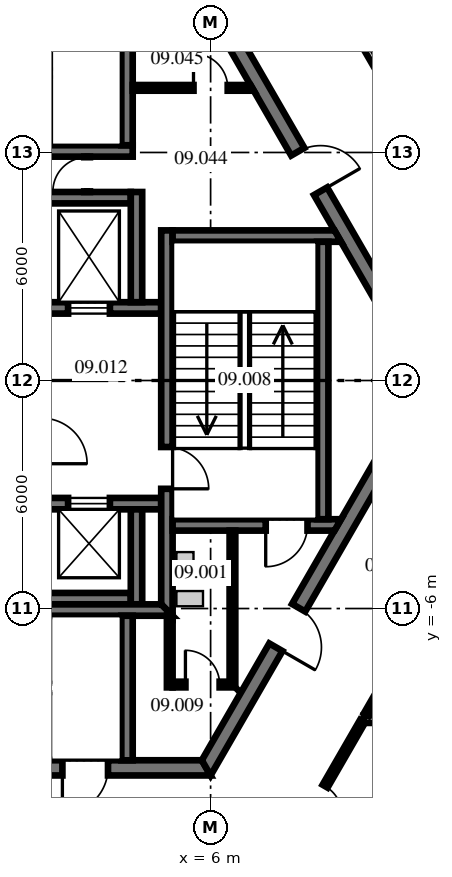
"""IFC4 building model, lengths in metres.
Left out: names, types, materials, properties, quantities, classifications, styles, units other than length and angle.
Written with IfcOpenShell. Run it as: python <this file> out.ifc"""

import sys

from ifc_helpers import new_model, si_unit, direction, frame, frame_2d, origin, place, context, subcontext, project, spatial, polyline, rectangle, outline, extrude, source, transform, mapped, element, fill, save


model = new_model("IFC4")
c1 = context("Model", 3, precision=1e-05, world=origin(), true_north=direction((0.0, 1.0)))
c2 = subcontext(c1, "Body", "Model", "MODEL_VIEW")
j1 = project(units=[si_unit("LENGTHUNIT", "METRE"), si_unit("PLANEANGLEUNIT", "RADIAN")], contexts=[c1])
p1 = place(None, origin())
s1 = spatial("IfcSite", under=j1, at=p1, CompositionType="ELEMENT")
p2 = place(p1, origin())
s2 = spatial("IfcBuilding", under=s1, at=p2, CompositionType="ELEMENT")
p3 = place(p2, frame((0.0, 0.0, 41.8)))
s3 = spatial("IfcBuildingStorey", under=s2, at=p3, CompositionType="ELEMENT", Elevation=41.8)
m1 = source(origin(), c2, "Body", "SweptSolid", [
    extrude(outline(polyline([(-0.115, -0.2), (11.885, -0.2), (11.654, 0.2), (0.115, 0.2), (-0.115, -0.2)])), origin(), (0.0, 0.0, 1.0), 4.1),
])
p4 = place(p3, frame((11.769, 0.0, 0.0), z_axis=(0.0, 0.0, 1.0), x_axis=(-0.499996592174, 0.866027371285, 0.0)))
e1 = element("IfcWall", 1, at=p4, inside=s3, PredefinedType="SHEAR", context=c2, shape_type="MappedRepresentation", body=[
    mapped(m1, transform((0.0, 0.0, 0.0), scale=1.0)),
])
p5 = place(p4, frame((5.75, 0.0, 0.0)))
e2 = element("IfcOpeningElement", 2, at=p5, cuts=e1, PredefinedType="OPENING", context=c2, shape_type="SweptSolid", body=[
    extrude(rectangle(XDim=1.2, YDim=2.1, at=frame_2d((0.6, 1.05))), frame((0.0, 0.21, 0.0), z_axis=(0.0, -1.0, 0.0), x_axis=(1.0, 0.0, 0.0)), (0.0, 0.0, 1.0), 0.42),
])
p6 = place(p3, frame((-5.885, -10.192, 0.0), z_axis=(0.0, 0.0, 1.0), x_axis=(1.0, 0.0, 0.0)))
e3 = element("IfcWall", 3, at=p6, inside=s3, PredefinedType="SHEAR", context=c2, shape_type="MappedRepresentation", body=[
    mapped(m1, transform((0.0, 0.0, 0.0), scale=1.0)),
])
p7 = place(p6, frame((7.985, 0.0, 0.0)))
e4 = element("IfcOpeningElement", 4, at=p7, cuts=e3, PredefinedType="OPENING", context=c2, shape_type="SweptSolid", body=[
    extrude(rectangle(XDim=1.2, YDim=2.1, at=frame_2d((0.6, 1.05))), frame((0.0, 0.21, 0.0), z_axis=(0.0, -1.0, 0.0), x_axis=(1.0, 0.0, 0.0)), (0.0, 0.0, 1.0), 0.42),
])
p8 = place(p6, frame((0.534, 0.0, 0.0)))
e5 = element("IfcOpeningElement", 5, at=p8, cuts=e3, PredefinedType="OPENING", context=c2, shape_type="SweptSolid", body=[
    extrude(rectangle(XDim=0.9, YDim=2.1, at=frame_2d((0.45, 1.05))), frame((0.0, 0.21, 0.0), z_axis=(0.0, -1.0, 0.0), x_axis=(1.0, 0.0, 0.0)), (0.0, 0.0, 1.0), 0.42),
])
p9 = place(p3, frame((5.885, -10.192, 0.0), z_axis=(0.0, 0.0, 1.0), x_axis=(0.499996592174, 0.866027371285, 0.0)))
e6 = element("IfcWall", 6, at=p9, inside=s3, PredefinedType="SHEAR", context=c2, shape_type="MappedRepresentation", body=[
    mapped(m1, transform((0.0, 0.0, 0.0), scale=1.0)),
])
p10 = place(p9, frame((3.665, 0.0, 0.0)))
e7 = element("IfcOpeningElement", 7, at=p10, cuts=e6, PredefinedType="OPENING", context=c2, shape_type="SweptSolid", body=[
    extrude(rectangle(XDim=1.2, YDim=2.1, at=frame_2d((0.6, 1.05))), frame((0.0, 0.21, 0.0), z_axis=(0.0, -1.0, 0.0), x_axis=(1.0, 0.0, 0.0)), (0.0, 0.0, 1.0), 0.42),
])
m2 = source(origin(), c2, "Body", "SweptSolid", [
    extrude(rectangle(XDim=2.5, YDim=0.3, at=frame_2d((1.25, 0.0))), origin(), (0.0, 0.0, 1.0), 4.1),
])
p11 = place(p3, frame((1.4, 4.81, 0.0), z_axis=(0.0, 0.0, 1.0), x_axis=(1.0, 0.0, 0.0)))
e8 = element("IfcWall", 8, at=p11, inside=s3, PredefinedType="SHEAR", context=c2, shape_type="MappedRepresentation", body=[
    mapped(m2, transform((0.0, 0.0, 0.0), scale=1.0)),
])
m3 = source(origin(), c2, "Body", "SweptSolid", [
    extrude(rectangle(XDim=3.0, YDim=0.3, at=frame_2d((1.5, 0.0))), origin(), (0.0, 0.0, 1.0), 4.1),
])
p12 = place(p3, frame((1.7, 1.91, 0.0), z_axis=(0.0, 0.0, 1.0), x_axis=(1.0, 0.0, 0.0)))
e9 = element("IfcWall", 9, at=p12, inside=s3, PredefinedType="SHEAR", context=c2, shape_type="MappedRepresentation", body=[
    mapped(m3, transform((0.0, 0.0, 0.0), scale=1.0)),
])
p13 = place(p12, frame((0.55, 0.0, 0.0)))
e10 = element("IfcOpeningElement", 10, at=p13, cuts=e9, PredefinedType="OPENING", context=c2, shape_type="SweptSolid", body=[
    extrude(rectangle(XDim=1.1, YDim=2.1, at=frame_2d((0.55, 1.05))), frame((0.0, 0.16, 0.0), z_axis=(0.0, -1.0, 0.0), x_axis=(1.0, 0.0, 0.0)), (0.0, 0.0, 1.0), 0.32),
])
m4 = source(origin(), c2, "Body", "SweptSolid", [
    extrude(rectangle(XDim=2.9, YDim=0.3, at=frame_2d((1.45, 0.0))), origin(), (0.0, 0.0, 1.0), 4.1),
])
p14 = place(p3, frame((4.05, 2.06, 0.0), z_axis=(0.0, 0.0, 1.0), x_axis=(0.0, 1.0, 0.0)))
e11 = element("IfcWall", 11, at=p14, inside=s3, PredefinedType="SHEAR", context=c2, shape_type="MappedRepresentation", body=[
    mapped(m4, transform((0.0, 0.0, 0.0), scale=1.0)),
])
m5 = source(origin(), c2, "Body", "SweptSolid", [
    extrude(rectangle(XDim=12.8, YDim=0.3, at=frame_2d((6.4, 0.0))), origin(), (0.0, 0.0, 1.0), 4.1),
])
p15 = place(p3, frame((-8.1, -3.24, 0.0), z_axis=(0.0, 0.0, 1.0), x_axis=(1.0, 0.0, 0.0)))
e12 = element("IfcWall", 12, at=p15, inside=s3, PredefinedType="SHEAR", context=c2, shape_type="MappedRepresentation", body=[
    mapped(m5, transform((0.0, 0.0, 0.0), scale=1.0)),
])
p16 = place(p15, frame((1.113, 0.0, 0.0)))
e13 = element("IfcOpeningElement", 13, at=p16, cuts=e12, PredefinedType="OPENING", context=c2, shape_type="SweptSolid", body=[
    extrude(rectangle(XDim=0.9, YDim=2.1, at=frame_2d((0.45, 1.05))), frame((0.0, 0.16, 0.0), z_axis=(0.0, -1.0, 0.0), x_axis=(1.0, 0.0, 0.0)), (0.0, 0.0, 1.0), 0.32),
])
p17 = place(p15, frame((5.788, 0.0, 0.0)))
e14 = element("IfcOpeningElement", 14, at=p17, cuts=e12, PredefinedType="OPENING", context=c2, shape_type="SweptSolid", body=[
    extrude(rectangle(XDim=0.9, YDim=2.1, at=frame_2d((0.45, 1.05))), frame((0.0, 0.16, 0.0), z_axis=(0.0, -1.0, 0.0), x_axis=(1.0, 0.0, 0.0)), (0.0, 0.0, 1.0), 0.32),
])
p18 = place(p15, frame((10.35, 0.0, 0.0)))
e15 = element("IfcOpeningElement", 15, at=p18, cuts=e12, PredefinedType="OPENING", context=c2, shape_type="SweptSolid", body=[
    extrude(rectangle(XDim=1.1, YDim=2.1, at=frame_2d((0.55, 1.05))), frame((0.0, 0.16, 0.0), z_axis=(0.0, -1.0, 0.0), x_axis=(1.0, 0.0, 0.0)), (0.0, 0.0, 1.0), 0.32),
])
m6 = source(origin(), c2, "Body", "SweptSolid", [
    extrude(outline(polyline([(12.0, -0.15), (-0.04, -0.15), (-0.213, 0.15), (12.0, 0.15), (12.0, -0.15)])), origin(), (0.0, 0.0, 1.0), 4.1),
])
p19 = place(p3, frame((-8.1, -5.74, 0.0), z_axis=(0.0, 0.0, 1.0), x_axis=(1.0, 0.0, 0.0)))
e16 = element("IfcWall", 16, at=p19, inside=s3, PredefinedType="SHEAR", context=c2, shape_type="MappedRepresentation", body=[
    mapped(m6, transform((0.0, 0.0, 0.0), scale=1.0)),
])
p20 = place(p3, frame((4.05, -5.89, 0.0), z_axis=(0.0, 0.0, 1.0), x_axis=(0.0, 1.0, 0.0)))
e17 = element("IfcWall", 17, at=p20, inside=s3, PredefinedType="SHEAR", context=c2, shape_type="MappedRepresentation", body=[
    mapped(m2, transform((0.0, 0.0, 0.0), scale=1.0)),
])
m7 = source(origin(), c2, "Body", "SweptSolid", [
    extrude(outline(polyline([(-0.15, -0.15), (9.99, -0.15), (9.99, 0.15), (0.15, 0.15), (-0.15, -0.15)])), origin(), (0.0, 0.0, 1.0), 4.1),
])
p21 = place(p3, frame((4.85, -6.04, 0.0), z_axis=(0.0, 0.0, 1.0), x_axis=(0.0, 1.0, 0.0)))
e18 = element("IfcWall", 18, at=p21, inside=s3, PredefinedType="SHEAR", context=c2, shape_type="MappedRepresentation", body=[
    mapped(m7, transform((0.0, 0.0, 0.0), scale=1.0)),
])
p22 = place(p21, frame((3.19, 0.0, 0.0)))
e19 = element("IfcOpeningElement", 19, at=p22, cuts=e18, PredefinedType="OPENING", context=c2, shape_type="SweptSolid", body=[
    extrude(rectangle(XDim=1.1, YDim=2.1, at=frame_2d((0.55, 1.05))), frame((0.0, 0.16, 0.0), z_axis=(0.0, -1.0, 0.0), x_axis=(1.0, 0.0, 0.0)), (0.0, 0.0, 1.0), 0.32),
])
m8 = source(origin(), c2, "Body", "SweptSolid", [
    extrude(outline(polyline([(0.0, -0.15), (0.0, 0.15), (4.26, 0.15), (4.433, -0.15), (0.0, -0.15)])), origin(), (0.0, 0.0, 1.0), 4.1),
])
p23 = place(p3, frame((5.0, 3.8, 0.0), z_axis=(0.0, 0.0, 1.0), x_axis=(1.0, 0.0, 0.0)))
e20 = element("IfcWall", 20, at=p23, inside=s3, PredefinedType="SHEAR", context=c2, shape_type="MappedRepresentation", body=[
    mapped(m8, transform((0.0, 0.0, 0.0), scale=1.0)),
])
m9 = source(origin(), c2, "Body", "SweptSolid", [
    extrude(outline(polyline([(0.0, -0.15), (0.0, 0.15), (4.433, 0.15), (4.26, -0.15), (0.0, -0.15)])), origin(), (0.0, 0.0, 1.0), 4.1),
])
p24 = place(p3, frame((5.0, -3.8, 0.0), z_axis=(0.0, 0.0, 1.0), x_axis=(1.0, 0.0, 0.0)))
e21 = element("IfcWall", 21, at=p24, inside=s3, PredefinedType="SHEAR", context=c2, shape_type="MappedRepresentation", body=[
    mapped(m9, transform((0.0, 0.0, 0.0), scale=1.0)),
])
p25 = place(p24, frame((2.45, 0.0, 0.0)))
e22 = element("IfcOpeningElement", 22, at=p25, cuts=e21, PredefinedType="OPENING", context=c2, shape_type="SweptSolid", body=[
    extrude(rectangle(XDim=1.1, YDim=2.1, at=frame_2d((0.55, 1.05))), frame((0.0, 0.16, 0.0), z_axis=(0.0, -1.0, 0.0), x_axis=(1.0, 0.0, 0.0)), (0.0, 0.0, 1.0), 0.32),
])
m10 = source(origin(), c2, "Body", "SweptSolid", [
    extrude(rectangle(XDim=7.3, YDim=0.3, at=frame_2d((3.65, 0.0))), origin(), (0.0, 0.0, 1.0), 4.1),
])
p26 = place(p3, frame((8.95, -3.65, 0.0), z_axis=(0.0, 0.0, 1.0), x_axis=(0.0, 1.0, 0.0)))
e23 = element("IfcWall", 23, at=p26, inside=s3, PredefinedType="SHEAR", context=c2, shape_type="MappedRepresentation", body=[
    mapped(m10, transform((0.0, 0.0, 0.0), scale=1.0)),
])
m11 = source(origin(), c2, "Body", "SweptSolid", [
    extrude(rectangle(XDim=7.9, YDim=0.3, at=frame_2d((3.95, 0.0))), origin(), (0.0, 0.0, 1.0), 4.1),
])
p27 = place(p3, frame((-3.95, 6.04, 0.0), z_axis=(0.0, 0.0, 1.0), x_axis=(1.0, 0.0, 0.0)))
e24 = element("IfcWall", 24, at=p27, inside=s3, PredefinedType="SHEAR", context=c2, shape_type="MappedRepresentation", body=[
    mapped(m11, transform((0.0, 0.0, 0.0), scale=1.0)),
])
m12 = source(origin(), c2, "Body", "SweptSolid", [
    extrude(outline(polyline([(0.0, -0.15), (0.0, 0.15), (3.804, 0.15), (3.804, -0.15), (0.0, -0.15)])), origin(), (0.0, 0.0, 1.0), 4.1),
])
p28 = place(p3, frame((3.8, 6.19, 0.0), z_axis=(0.0, 0.0, 1.0), x_axis=(0.0, 1.0, 0.0)))
e25 = element("IfcWall", 25, at=p28, inside=s3, PredefinedType="SHEAR", context=c2, shape_type="MappedRepresentation", body=[
    mapped(m12, transform((0.0, 0.0, 0.0), scale=1.0)),
])
m13 = source(origin(), c2, "Body", "SweptSolid", [
    extrude(outline(polyline([(0.0, -0.15), (8.95, -0.15), (8.65, 0.15), (0.0, 0.15), (0.0, -0.15)])), origin(), (0.0, 0.0, 1.0), 4.1),
])
p29 = place(p3, frame((-3.95, -6.04, 0.0), z_axis=(0.0, 0.0, 1.0), x_axis=(1.0, 0.0, 0.0)))
e26 = element("IfcWall", 26, at=p29, inside=s3, PredefinedType="SHEAR", context=c2, shape_type="MappedRepresentation", body=[
    mapped(m13, transform((0.0, 0.0, 0.0), scale=1.0)),
])
m14 = source(origin(), c2, "Body", "SweptSolid", [
    extrude(outline(polyline([(3.8, -0.15), (-0.004, -0.15), (-0.004, 0.15), (3.8, 0.15), (3.8, -0.15)])), origin(), (0.0, 0.0, 1.0), 4.1),
])
p30 = place(p3, frame((3.8, -9.99, 0.0), z_axis=(0.0, 0.0, 1.0), x_axis=(0.0, 1.0, 0.0)))
e27 = element("IfcWall", 27, at=p30, inside=s3, PredefinedType="SHEAR", context=c2, shape_type="MappedRepresentation", body=[
    mapped(m14, transform((0.0, 0.0, 0.0), scale=1.0)),
])
m15 = source(origin(), c2, "Body", "SweptSolid", [
    extrude(outline(polyline([(0.0, -0.075), (1.65, -0.075), (1.5, 0.075), (0.0, 0.075), (0.0, -0.075)])), origin(), (0.0, 0.0, 1.0), 4.1),
])
p31 = place(p3, frame((5.0, -8.0, 0.0), z_axis=(0.0, 0.0, 1.0), x_axis=(1.0, 0.0, 0.0)))
e28 = element("IfcWall", 28, at=p31, inside=s3, PredefinedType="PARTITIONING", context=c2, shape_type="MappedRepresentation", body=[
    mapped(m15, transform((0.0, 0.0, 0.0), scale=1.0)),
])
p32 = place(p31, frame((0.337, 0.0, 0.0)))
e29 = element("IfcOpeningElement", 29, at=p32, cuts=e28, PredefinedType="OPENING", context=c2, shape_type="SweptSolid", body=[
    extrude(rectangle(XDim=0.9, YDim=2.1, at=frame_2d((0.45, 1.05))), frame((0.0, 0.085, 0.0), z_axis=(0.0, -1.0, 0.0), x_axis=(1.0, 0.0, 0.0)), (0.0, 0.0, 1.0), 0.17),
])
m16 = source(origin(), c2, "Body", "SweptSolid", [
    extrude(outline(polyline([(-0.075, -0.075), (4.05, -0.075), (4.05, 0.075), (0.075, 0.075), (-0.075, -0.075)])), origin(), (0.0, 0.0, 1.0), 4.1),
])
p33 = place(p3, frame((6.575, -8.0, 0.0), z_axis=(0.0, 0.0, 1.0), x_axis=(0.0, 1.0, 0.0)))
e30 = element("IfcWall", 30, at=p33, inside=s3, PredefinedType="PARTITIONING", context=c2, shape_type="MappedRepresentation", body=[
    mapped(m16, transform((0.0, 0.0, 0.0), scale=1.0)),
])
m17 = source(origin(), c2, "Body", "SweptSolid", [
    extrude(rectangle(XDim=1.885, YDim=0.15, at=frame_2d((0.942, 0.0))), origin(), (0.0, 0.0, 1.0), 4.1),
])
p34 = place(p3, frame((4.925, -8.075, 0.0), z_axis=(0.0, 0.0, 1.0), x_axis=(0.0, 1.0, 0.0)))
e31 = element("IfcWall", 31, at=p34, inside=s3, PredefinedType="PARTITIONING", context=c2, shape_type="MappedRepresentation", body=[
    mapped(m17, transform((0.0, 0.0, 0.0), scale=1.0)),
])
m18 = source(origin(), c2, "Body", "SweptSolid", [
    extrude(outline(polyline([(0.0, -0.075), (0.0, 0.075), (3.102, 0.075), (3.188, -0.075), (0.0, -0.075)])), origin(), (0.0, 0.0, 1.0), 4.1),
])
p35 = place(p3, frame((3.95, 7.7, 0.0), z_axis=(0.0, 0.0, 1.0), x_axis=(1.0, 0.0, 0.0)))
e32 = element("IfcWall", 32, at=p35, inside=s3, PredefinedType="PARTITIONING", context=c2, shape_type="MappedRepresentation", body=[
    mapped(m18, transform((0.0, 0.0, 0.0), scale=1.0)),
])
p36 = place(p35, frame((1.6, 0.0, 0.0)))
e33 = element("IfcOpeningElement", 33, at=p36, cuts=e32, PredefinedType="OPENING", context=c2, shape_type="SweptSolid", body=[
    extrude(rectangle(XDim=0.9, YDim=2.1, at=frame_2d((0.45, 1.05))), frame((0.0, 0.085, 0.0), z_axis=(0.0, -1.0, 0.0), x_axis=(1.0, 0.0, 0.0)), (0.0, 0.0, 1.0), 0.17),
])
m19 = source(origin(), c2, "Body", "SweptSolid", [
    extrude(rectangle(XDim=0.93, YDim=0.15, at=frame_2d((0.465, 0.0))), origin(), (0.0, 0.0, 1.0), 4.1),
])
p37 = place(p3, frame((2.75, 4.96, 0.0), z_axis=(0.0, 0.0, 1.0), x_axis=(0.0, 1.0, 0.0)))
e34 = element("IfcWall", 34, at=p37, inside=s3, PredefinedType="PARTITIONING", context=c2, shape_type="MappedRepresentation", body=[
    mapped(m19, transform((0.0, 0.0, 0.0), scale=1.0)),
])
p38 = place(p37, frame((0.015, 0.0, 0.0)))
e35 = element("IfcOpeningElement", 35, at=p38, cuts=e34, PredefinedType="OPENING", context=c2, shape_type="SweptSolid", body=[
    extrude(rectangle(XDim=0.9, YDim=2.1, at=frame_2d((0.45, 1.05))), frame((0.0, 0.085, 0.0), z_axis=(0.0, -1.0, 0.0), x_axis=(1.0, 0.0, 0.0)), (0.0, 0.0, 1.0), 0.17),
])
p39 = place(p3, frame((7.623, 13.082, 0.0), z_axis=(0.0, 0.0, 1.0), x_axis=(0.499985944963, -0.866033518312, 0.0)))
e36 = element("IfcWall", 36, at=p39, inside=s3, PredefinedType="PARTITIONING", context=c2, shape_type="SweptSolid", body=[
    extrude(rectangle(XDim=15.105, YDim=0.2, at=frame_2d((7.553, 0.0))), origin(), (0.0, 0.0, 1.0), 4.1),
])
p40 = place(p39, frame((9.455, 0.0, 0.0)))
e37 = element("IfcOpeningElement", 37, at=p40, cuts=e36, PredefinedType="OPENING", context=c2, shape_type="SweptSolid", body=[
    extrude(rectangle(XDim=1.0, YDim=2.1, at=frame_2d((0.5, 1.05))), frame((0.0, 0.11, 0.0), z_axis=(0.0, -1.0, 0.0), x_axis=(1.0, 0.0, 0.0)), (0.0, 0.0, 1.0), 0.22),
])
m20 = source(origin(), c2, "Body", "SweptSolid", [
    extrude(rectangle(XDim=11.455, YDim=0.2, at=frame_2d((5.728, 0.0))), origin(), (0.0, 0.0, 1.0), 3.343),
])
p41 = place(p3, frame((10.031, -8.91, 0.0), z_axis=(0.0, 0.0, 1.0), x_axis=(1.0, 0.0, 0.0)))
e38 = element("IfcWall", 38, at=p41, inside=s3, PredefinedType="PARTITIONING", context=c2, shape_type="MappedRepresentation", body=[
    mapped(m20, transform((0.0, 0.0, 0.0), scale=1.0)),
])
p42 = place(p3, frame((7.603, -13.116, 0.0), z_axis=(0.0, 0.0, 1.0), x_axis=(0.500011970786, 0.866018492338, 0.0)))
e39 = element("IfcWall", 39, at=p42, inside=s3, PredefinedType="PARTITIONING", context=c2, shape_type="SweptSolid", body=[
    extrude(rectangle(XDim=4.793, YDim=0.15, at=frame_2d((2.397, 0.0))), origin(), (0.0, 0.0, 1.0), 4.1),
])
p43 = place(p42, frame((1.92, 0.0, 0.0)))
e40 = element("IfcOpeningElement", 40, at=p43, cuts=e39, PredefinedType="OPENING", context=c2, shape_type="SweptSolid", body=[
    extrude(rectangle(XDim=0.9, YDim=2.1, at=frame_2d((0.45, 1.05))), frame((0.0, 0.085, 0.0), z_axis=(0.0, -1.0, 0.0), x_axis=(1.0, 0.0, 0.0)), (0.0, 0.0, 1.0), 0.17),
])
p44 = place(p3, frame((10.1, -8.792, 0.0), z_axis=(0.0, 0.0, 1.0), x_axis=(0.499985875816, 0.866033558232, 0.0)))
e41 = element("IfcWall", 41, at=p44, inside=s3, PredefinedType="PARTITIONING", context=c2, shape_type="SweptSolid", body=[
    extrude(rectangle(XDim=10.082, YDim=0.15, at=frame_2d((5.041, 0.0))), origin(), (0.0, 0.0, 1.0), 4.1),
])
p45 = place(p7, frame((1.2, 0.0, 0.0), z_axis=(0.0, 0.0, 1.0), x_axis=(-1.0, 0.0, 0.0)))
e42 = element("IfcDoor", 42, at=p45, inside=s3, OperationType="SINGLE_SWING_RIGHT", PredefinedType="DOOR", context=c2, shape_type="SweptSolid", body=[
    extrude(rectangle(XDim=1.2, YDim=2.1, at=frame_2d((0.6, 1.05))), frame((0.0, 0.025, 0.0), z_axis=(0.0, -1.0, 0.0), x_axis=(1.0, 0.0, 0.0)), (0.0, 0.0, 1.0), 0.05),
])
fill(e4, e42)
p46 = place(p5, frame((1.2, 0.0, 0.0), z_axis=(0.0, 0.0, 1.0), x_axis=(-1.0, 0.0, 0.0)))
e43 = element("IfcDoor", 43, at=p46, inside=s3, OperationType="SINGLE_SWING_RIGHT", PredefinedType="DOOR", context=c2, shape_type="SweptSolid", body=[
    extrude(rectangle(XDim=1.2, YDim=2.1, at=frame_2d((0.6, 1.05))), frame((0.0, 0.025, 0.0), z_axis=(0.0, -1.0, 0.0), x_axis=(1.0, 0.0, 0.0)), (0.0, 0.0, 1.0), 0.05),
])
fill(e2, e43)
p47 = place(p10, frame((1.2, 0.0, 0.0), z_axis=(0.0, 0.0, 1.0), x_axis=(-1.0, 0.0, 0.0)))
e44 = element("IfcDoor", 44, at=p47, inside=s3, OperationType="SINGLE_SWING_RIGHT", PredefinedType="DOOR", context=c2, shape_type="SweptSolid", body=[
    extrude(rectangle(XDim=1.2, YDim=2.1, at=frame_2d((0.6, 1.05))), frame((0.0, 0.025, 0.0), z_axis=(0.0, -1.0, 0.0), x_axis=(1.0, 0.0, 0.0)), (0.0, 0.0, 1.0), 0.05),
])
fill(e7, e44)
p48 = place(p22, frame((1.1, 0.0, 0.0), z_axis=(0.0, 0.0, 1.0), x_axis=(-1.0, 0.0, 0.0)))
e45 = element("IfcDoor", 45, at=p48, inside=s3, OperationType="SINGLE_SWING_RIGHT", PredefinedType="DOOR", context=c2, shape_type="SweptSolid", body=[
    extrude(rectangle(XDim=1.1, YDim=2.1, at=frame_2d((0.55, 1.05))), frame((0.0, 0.025, 0.0), z_axis=(0.0, -1.0, 0.0), x_axis=(1.0, 0.0, 0.0)), (0.0, 0.0, 1.0), 0.05),
])
fill(e19, e45)
p49 = place(p25, frame((1.1, 0.0, 0.0), z_axis=(0.0, 0.0, 1.0), x_axis=(-1.0, 0.0, 0.0)))
e46 = element("IfcDoor", 46, at=p49, inside=s3, OperationType="SINGLE_SWING_RIGHT", PredefinedType="DOOR", context=c2, shape_type="SweptSolid", body=[
    extrude(rectangle(XDim=1.1, YDim=2.1, at=frame_2d((0.55, 1.05))), frame((0.0, 0.025, 0.0), z_axis=(0.0, -1.0, 0.0), x_axis=(1.0, 0.0, 0.0)), (0.0, 0.0, 1.0), 0.05),
])
fill(e22, e46)
p50 = place(p38, origin())
e47 = element("IfcDoor", 47, at=p50, inside=s3, OperationType="SINGLE_SWING_LEFT", PredefinedType="DOOR", context=c2, shape_type="SweptSolid", body=[
    extrude(rectangle(XDim=0.9, YDim=2.1, at=frame_2d((0.45, 1.05))), frame((0.0, 0.025, 0.0), z_axis=(0.0, -1.0, 0.0), x_axis=(1.0, 0.0, 0.0)), (0.0, 0.0, 1.0), 0.05),
])
fill(e35, e47)
p51 = place(p36, origin())
e48 = element("IfcDoor", 48, at=p51, inside=s3, OperationType="SINGLE_SWING_LEFT", PredefinedType="DOOR", context=c2, shape_type="SweptSolid", body=[
    extrude(rectangle(XDim=0.9, YDim=2.1, at=frame_2d((0.45, 1.05))), frame((0.0, 0.025, 0.0), z_axis=(0.0, -1.0, 0.0), x_axis=(1.0, 0.0, 0.0)), (0.0, 0.0, 1.0), 0.05),
])
fill(e33, e48)
p52 = place(p32, origin())
e49 = element("IfcDoor", 49, at=p52, inside=s3, OperationType="SINGLE_SWING_LEFT", PredefinedType="DOOR", context=c2, shape_type="SweptSolid", body=[
    extrude(rectangle(XDim=0.9, YDim=2.1, at=frame_2d((0.45, 1.05))), frame((0.0, 0.025, 0.0), z_axis=(0.0, -1.0, 0.0), x_axis=(1.0, 0.0, 0.0)), (0.0, 0.0, 1.0), 0.05),
])
fill(e29, e49)
p53 = place(p13, origin())
e50 = element("IfcDoor", 50, at=p53, inside=s3, OperationType="DOUBLE_DOOR_SLIDING", PredefinedType="DOOR", context=c2, shape_type="SweptSolid", body=[
    extrude(rectangle(XDim=1.1, YDim=2.1, at=frame_2d((0.55, 1.05))), frame((0.0, 0.025, 0.0), z_axis=(0.0, -1.0, 0.0), x_axis=(1.0, 0.0, 0.0)), (0.0, 0.0, 1.0), 0.05),
])
fill(e10, e50)
p54 = place(p18, origin())
e51 = element("IfcDoor", 51, at=p54, inside=s3, OperationType="DOUBLE_DOOR_SLIDING", PredefinedType="DOOR", context=c2, shape_type="SweptSolid", body=[
    extrude(rectangle(XDim=1.1, YDim=2.1, at=frame_2d((0.55, 1.05))), frame((0.0, 0.025, 0.0), z_axis=(0.0, -1.0, 0.0), x_axis=(1.0, 0.0, 0.0)), (0.0, 0.0, 1.0), 0.05),
])
fill(e15, e51)
p55 = place(p43, origin())
e52 = element("IfcDoor", 52, at=p55, inside=s3, OperationType="SINGLE_SWING_RIGHT", PredefinedType="DOOR", context=c2, shape_type="SweptSolid", body=[
    extrude(rectangle(XDim=0.9, YDim=2.1, at=frame_2d((0.45, 1.05))), frame((0.0, 0.025, 0.0), z_axis=(0.0, -1.0, 0.0), x_axis=(1.0, 0.0, 0.0)), (0.0, 0.0, 1.0), 0.05),
])
fill(e40, e52)
save(model, sys.argv[1])
